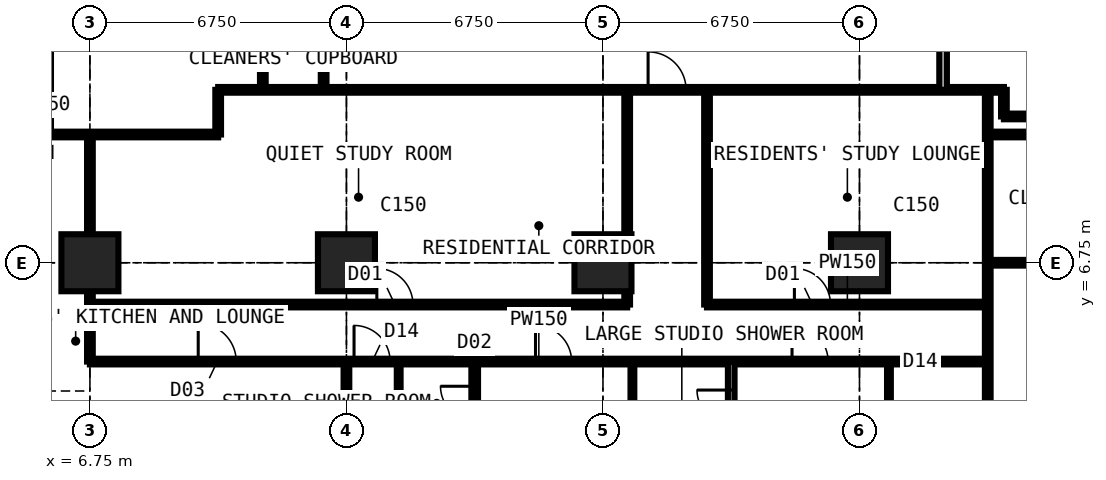
"""IFC4 building model, lengths in metres.
Left out: names, types, materials, properties, quantities, classifications, styles, units other than length and angle.
Written with IfcOpenShell. Run it as: python <this file> out.ifc"""

import sys

from ifc_helpers import new_model, si_unit, direction, frame, frame_2d, origin, origin_2d, place, context, subcontext, project, spatial, rectangle, extrude, element, fill, save


model = new_model("IFC4")
c1 = context("Model", 3, precision=1e-05, world=origin(), true_north=direction((0.0, 1.0)))
c2 = subcontext(c1, "Body", "Model", "MODEL_VIEW")
j1 = project(units=[si_unit("LENGTHUNIT", "METRE"), si_unit("PLANEANGLEUNIT", "RADIAN")], contexts=[c1])
p1 = place(None, origin())
s1 = spatial("IfcSite", under=j1, at=p1, CompositionType="ELEMENT")
p2 = place(p1, origin())
s2 = spatial("IfcBuilding", under=s1, at=p2, CompositionType="ELEMENT")
p3 = place(p2, frame((0.0, 0.0, 126.9)))
s3 = spatial("IfcBuildingStorey", under=s2, at=p3, CompositionType="ELEMENT", Elevation=126.9)
for number, where, z_axis, x_axis in (
    (1, (6.75, 6.75, 0.0), (0.0, 0.0, 1.0), (1.0, 0.0, 0.0)),
    (2, (13.5, 6.75, 0.0), (0.0, 0.0, 1.0), (1.0, 0.0, 0.0)),
    (3, (20.25, 6.75, 0.0), (0.0, 0.0, 1.0), (1.0, 0.0, 0.0)),
    (4, (27.0, 6.75, 0.0), (0.0, 0.0, 1.0), (1.0, 0.0, 0.0)),
):
    element("IfcColumn", number, at=place(p3, frame(where, z_axis=z_axis, x_axis=x_axis)), inside=s3, PredefinedType="COLUMN", context=c2, shape_type="SweptSolid", body=[
        extrude(rectangle(XDim=1.5, YDim=1.5, at=origin_2d()), origin(), (0.0, 0.0, 1.0), 3.6),
    ])
p4 = place(p3, frame((-0.734, 10.125, 0.0), z_axis=(0.0, 0.0, 1.0), x_axis=(1.0, 0.0, 0.0)))
e5 = element("IfcWall", 5, at=p4, inside=s3, PredefinedType="PARTITIONING", context=c2, shape_type="SweptSolid", body=[
    extrude(rectangle(XDim=10.859, YDim=0.15, at=frame_2d((5.429, 0.0))), origin(), (0.0, 0.0, 1.0), 3.375),
])
p5 = place(p3, frame((6.75, 4.15, 0.0), z_axis=(0.0, 0.0, 1.0), x_axis=(0.0, 1.0, 0.0)))
e6 = element("IfcWall", 6, at=p5, inside=s3, PredefinedType="PARTITIONING", context=c2, shape_type="SweptSolid", body=[
    extrude(rectangle(XDim=5.975, YDim=0.15, at=frame_2d((2.988, 0.0))), origin(), (0.0, 0.0, 1.0), 2.877),
])
p6 = place(p3, frame((6.75, 4.15, 0.0), z_axis=(0.0, 0.0, 1.0), x_axis=(1.0, 0.0, 0.0)))
e7 = element("IfcWall", 7, at=p6, inside=s3, PredefinedType="PARTITIONING", context=c2, shape_type="SweptSolid", body=[
    extrude(rectangle(XDim=23.625, YDim=0.15, at=frame_2d((11.812, 0.0))), origin(), (0.0, 0.0, 1.0), 3.375),
])
p7 = place(p6, frame((2.85, 0.0, 0.0)))
e8 = element("IfcOpeningElement", 8, at=p7, cuts=e7, PredefinedType="OPENING", context=c2, shape_type="SweptSolid", body=[
    extrude(rectangle(XDim=1.0, YDim=2.2, at=frame_2d((0.5, 1.1))), frame((0.0, 0.085, 0.0), z_axis=(0.0, -1.0, 0.0), x_axis=(1.0, 0.0, 0.0)), (0.0, 0.0, 1.0), 0.17),
])
p8 = place(p6, frame((18.475, 0.0, 0.0)))
e9 = element("IfcOpeningElement", 9, at=p8, cuts=e7, PredefinedType="OPENING", context=c2, shape_type="SweptSolid", body=[
    extrude(rectangle(XDim=0.95, YDim=2.2, at=frame_2d((0.475, 1.1))), frame((0.0, 0.085, 0.0), z_axis=(0.0, -1.0, 0.0), x_axis=(1.0, 0.0, 0.0)), (0.0, 0.0, 1.0), 0.17),
])
p9 = place(p6, frame((11.725, 0.0, 0.0)))
e10 = element("IfcOpeningElement", 10, at=p9, cuts=e7, PredefinedType="OPENING", context=c2, shape_type="SweptSolid", body=[
    extrude(rectangle(XDim=0.95, YDim=2.2, at=frame_2d((0.475, 1.1))), frame((0.0, 0.085, 0.0), z_axis=(0.0, -1.0, 0.0), x_axis=(1.0, 0.0, 0.0)), (0.0, 0.0, 1.0), 0.17),
])
p10 = place(p6, frame((6.95, 0.0, 0.0)))
e11 = element("IfcOpeningElement", 11, at=p10, cuts=e7, PredefinedType="OPENING", context=c2, shape_type="SweptSolid", body=[
    extrude(rectangle(XDim=0.95, YDim=2.2, at=frame_2d((0.475, 1.1))), frame((0.0, 0.085, 0.0), z_axis=(0.0, -1.0, 0.0), x_axis=(1.0, 0.0, 0.0)), (0.0, 0.0, 1.0), 0.17),
])
p11 = place(p3, frame((6.75, 5.65, 0.0), z_axis=(0.0, 0.0, 1.0), x_axis=(1.0, 0.0, 0.0)))
e12 = element("IfcWall", 12, at=p11, inside=s3, PredefinedType="PARTITIONING", context=c2, shape_type="SweptSolid", body=[
    extrude(rectangle(XDim=14.137, YDim=0.15, at=frame_2d((7.069, 0.0))), origin(), (0.0, 0.0, 1.0), 3.375),
])
p12 = place(p11, frame((7.55, 0.0, 0.0)))
e13 = element("IfcOpeningElement", 13, at=p12, cuts=e12, PredefinedType="OPENING", context=c2, shape_type="SweptSolid", body=[
    extrude(rectangle(XDim=0.95, YDim=2.2, at=frame_2d((0.475, 1.1))), frame((0.0, 0.085, 0.0), z_axis=(0.0, -1.0, 0.0), x_axis=(1.0, 0.0, 0.0)), (0.0, 0.0, 1.0), 0.17),
])
p13 = place(p3, frame((10.125, 10.125, 0.0), z_axis=(0.0, 0.0, 1.0), x_axis=(0.0, 1.0, 0.0)))
e14 = element("IfcWall", 14, at=p13, inside=s3, PredefinedType="PARTITIONING", context=c2, shape_type="SweptSolid", body=[
    extrude(rectangle(XDim=1.175, YDim=0.15, at=frame_2d((0.587, 0.0))), origin(), (0.0, 0.0, 1.0), 3.375),
])
p14 = place(p3, frame((10.125, 11.3, 0.0), z_axis=(0.0, 0.0, 1.0), x_axis=(1.0, 0.0, 0.0)))
e15 = element("IfcWall", 15, at=p14, inside=s3, PredefinedType="PARTITIONING", context=c2, shape_type="SweptSolid", body=[
    extrude(rectangle(XDim=20.675, YDim=0.15, at=frame_2d((10.337, 0.0))), origin(), (0.0, 0.0, 1.0), 3.375),
])
p15 = place(p14, frame((11.312, 0.0, 0.0)))
e16 = element("IfcOpeningElement", 16, at=p15, cuts=e15, PredefinedType="OPENING", context=c2, shape_type="SweptSolid", body=[
    extrude(rectangle(XDim=1.0, YDim=2.2, at=frame_2d((0.5, 1.1))), frame((0.0, 0.085, 0.0), z_axis=(0.0, -1.0, 0.0), x_axis=(1.0, 0.0, 0.0)), (0.0, 0.0, 1.0), 0.17),
])
p16 = place(p3, frame((11.3, 11.3, 0.0), z_axis=(0.0, 0.0, 1.0), x_axis=(0.0, 1.0, 0.0)))
e17 = element("IfcWall", 17, at=p16, inside=s3, PredefinedType="PARTITIONING", context=c2, shape_type="SweptSolid", body=[
    extrude(rectangle(XDim=19.3, YDim=0.15, at=frame_2d((9.65, 0.0))), origin(), (0.0, 0.0, 1.0), 3.375),
])
p17 = place(p16, frame((13.525, 0.0, 0.0)))
e18 = element("IfcOpeningElement", 18, at=p17, cuts=e17, PredefinedType="OPENING", context=c2, shape_type="SweptSolid", body=[
    extrude(rectangle(XDim=1.0, YDim=2.2, at=frame_2d((0.5, 1.1))), frame((0.0, 0.085, 0.0), z_axis=(0.0, -1.0, 0.0), x_axis=(1.0, 0.0, 0.0)), (0.0, 0.0, 1.0), 0.17),
])
p18 = place(p16, frame((10.438, 0.0, 0.0)))
e19 = element("IfcOpeningElement", 19, at=p18, cuts=e17, PredefinedType="OPENING", context=c2, shape_type="SweptSolid", body=[
    extrude(rectangle(XDim=1.0, YDim=2.2, at=frame_2d((0.5, 1.1))), frame((0.0, 0.085, 0.0), z_axis=(0.0, -1.0, 0.0), x_axis=(1.0, 0.0, 0.0)), (0.0, 0.0, 1.0), 0.17),
])
p19 = place(p3, frame((12.9, 11.3, 0.0), z_axis=(0.0, 0.0, 1.0), x_axis=(0.0, 1.0, 0.0)))
e20 = element("IfcWall", 20, at=p19, inside=s3, PredefinedType="PARTITIONING", context=c2, shape_type="SweptSolid", body=[
    extrude(rectangle(XDim=1.6, YDim=0.15, at=frame_2d((0.8, 0.0))), origin(), (0.0, 0.0, 1.0), 3.375),
])
p20 = place(p3, frame((13.5, -0.734, 0.0), z_axis=(0.0, 0.0, 1.0), x_axis=(0.0, 1.0, 0.0)))
e21 = element("IfcWall", 21, at=p20, inside=s3, PredefinedType="PARTITIONING", context=c2, shape_type="SweptSolid", body=[
    extrude(rectangle(XDim=4.884, YDim=0.15, at=frame_2d((2.442, 0.0))), origin(), (0.0, 0.0, 1.0), 2.61),
])
p21 = place(p3, frame((14.875, 1.95, 0.0), z_axis=(0.0, 0.0, 1.0), x_axis=(0.0, 1.0, 0.0)))
e22 = element("IfcWall", 22, at=p21, inside=s3, PredefinedType="PARTITIONING", context=c2, shape_type="SweptSolid", body=[
    extrude(rectangle(XDim=2.2, YDim=0.1, at=frame_2d((1.1, 0.0))), origin(), (0.0, 0.0, 1.0), 3.375),
])
p22 = place(p3, frame((16.875, -0.734, 0.0), z_axis=(0.0, 0.0, 1.0), x_axis=(0.0, 1.0, 0.0)))
e23 = element("IfcWall", 23, at=p22, inside=s3, PredefinedType="PARTITIONING", context=c2, shape_type="SweptSolid", body=[
    extrude(rectangle(XDim=4.884, YDim=0.175, at=frame_2d((2.442, 0.0))), origin(), (0.0, 0.0, 1.0), 3.375),
])
p23 = place(p22, frame((3.334, 0.0, 0.0)))
e24 = element("IfcOpeningElement", 24, at=p23, cuts=e23, PredefinedType="OPENING", context=c2, shape_type="SweptSolid", body=[
    extrude(rectangle(XDim=0.9, YDim=2.2, at=frame_2d((0.45, 1.1))), frame((0.0, 0.097, 0.0), z_axis=(0.0, -1.0, 0.0), x_axis=(1.0, 0.0, 0.0)), (0.0, 0.0, 1.0), 0.195),
])
p24 = place(p3, frame((20.887, 5.65, 0.0), z_axis=(0.0, 0.0, 1.0), x_axis=(0.0, 1.0, 0.0)))
e25 = element("IfcWall", 25, at=p24, inside=s3, PredefinedType="PARTITIONING", context=c2, shape_type="SweptSolid", body=[
    extrude(rectangle(XDim=5.65, YDim=0.15, at=frame_2d((2.825, 0.0))), origin(), (0.0, 0.0, 1.0), 3.375),
])
p25 = place(p3, frame((21.025, 1.75, 0.0), z_axis=(0.0, 0.0, 1.0), x_axis=(0.0, 1.0, 0.0)))
e26 = element("IfcWall", 26, at=p25, inside=s3, PredefinedType="PARTITIONING", context=c2, shape_type="SweptSolid", body=[
    extrude(rectangle(XDim=2.4, YDim=0.1, at=frame_2d((1.2, 0.0))), origin(), (0.0, 0.0, 1.0), 3.375),
])
p26 = place(p3, frame((22.988, 5.65, 0.0), z_axis=(0.0, 0.0, 1.0), x_axis=(1.0, 0.0, 0.0)))
e27 = element("IfcWall", 27, at=p26, inside=s3, PredefinedType="PARTITIONING", context=c2, shape_type="SweptSolid", body=[
    extrude(rectangle(XDim=7.387, YDim=0.15, at=frame_2d((3.694, 0.0))), origin(), (0.0, 0.0, 1.0), 3.375),
])
p27 = place(p26, frame((2.3, 0.0, 0.0)))
e28 = element("IfcOpeningElement", 28, at=p27, cuts=e27, PredefinedType="OPENING", context=c2, shape_type="SweptSolid", body=[
    extrude(rectangle(XDim=0.95, YDim=2.2, at=frame_2d((0.475, 1.1))), frame((0.0, 0.085, 0.0), z_axis=(0.0, -1.0, 0.0), x_axis=(1.0, 0.0, 0.0)), (0.0, 0.0, 1.0), 0.17),
])
p28 = place(p3, frame((22.988, 5.65, 0.0), z_axis=(0.0, 0.0, 1.0), x_axis=(0.0, 1.0, 0.0)))
e29 = element("IfcWall", 29, at=p28, inside=s3, PredefinedType="PARTITIONING", context=c2, shape_type="SweptSolid", body=[
    extrude(rectangle(XDim=5.65, YDim=0.15, at=frame_2d((2.825, 0.0))), origin(), (0.0, 0.0, 1.0), 3.375),
])
p29 = place(p3, frame((23.625, -0.734, 0.0), z_axis=(0.0, 0.0, 1.0), x_axis=(0.0, 1.0, 0.0)))
e30 = element("IfcWall", 30, at=p29, inside=s3, PredefinedType="PARTITIONING", context=c2, shape_type="SweptSolid", body=[
    extrude(rectangle(XDim=4.884, YDim=0.175, at=frame_2d((2.442, 0.0))), origin(), (0.0, 0.0, 1.0), 3.375),
])
p30 = place(p29, frame((3.234, 0.0, 0.0)))
e31 = element("IfcOpeningElement", 31, at=p30, cuts=e30, PredefinedType="OPENING", context=c2, shape_type="SweptSolid", body=[
    extrude(rectangle(XDim=0.9, YDim=2.2, at=frame_2d((0.45, 1.1))), frame((0.0, 0.097, 0.0), z_axis=(0.0, -1.0, 0.0), x_axis=(1.0, 0.0, 0.0)), (0.0, 0.0, 1.0), 0.195),
])
p31 = place(p3, frame((27.775, 1.75, 0.0), z_axis=(0.0, 0.0, 1.0), x_axis=(0.0, 1.0, 0.0)))
e32 = element("IfcWall", 32, at=p31, inside=s3, PredefinedType="PARTITIONING", context=c2, shape_type="SweptSolid", body=[
    extrude(rectangle(XDim=2.4, YDim=0.1, at=frame_2d((1.2, 0.0))), origin(), (0.0, 0.0, 1.0), 3.375),
])
p32 = place(p3, frame((29.2, 11.3, 0.0), z_axis=(0.0, 0.0, 1.0), x_axis=(0.0, 1.0, 0.0)))
e33 = element("IfcWall", 33, at=p32, inside=s3, PredefinedType="PARTITIONING", context=c2, shape_type="SweptSolid", body=[
    extrude(rectangle(XDim=17.9, YDim=0.2, at=frame_2d((8.95, 0.0))), origin(), (0.0, 0.0, 1.0), 3.375),
])
p33 = place(p32, frame((8.35, 0.0, 0.0)))
e34 = element("IfcOpeningElement", 34, at=p33, cuts=e33, PredefinedType="OPENING", context=c2, shape_type="SweptSolid", body=[
    extrude(rectangle(XDim=1.2, YDim=2.2, at=frame_2d((0.6, 1.1))), frame((0.0, 0.11, 0.0), z_axis=(0.0, -1.0, 0.0), x_axis=(1.0, 0.0, 0.0)), (0.0, 0.0, 1.0), 0.22),
])
p34 = place(p3, frame((30.375, -0.734, 0.0), z_axis=(0.0, 0.0, 1.0), x_axis=(0.0, 1.0, 0.0)))
e35 = element("IfcWall", 35, at=p34, inside=s3, PredefinedType="PARTITIONING", context=c2, shape_type="SweptSolid", body=[
    extrude(rectangle(XDim=12.034, YDim=0.15, at=frame_2d((6.017, 0.0))), origin(), (0.0, 0.0, 1.0), 3.375),
])
p35 = place(p3, frame((30.375, 6.75, 0.0), z_axis=(0.0, 0.0, 1.0), x_axis=(1.0, 0.0, 0.0)))
e36 = element("IfcWall", 36, at=p35, inside=s3, PredefinedType="PARTITIONING", context=c2, shape_type="SweptSolid", body=[
    extrude(rectangle(XDim=10.859, YDim=0.15, at=frame_2d((5.429, 0.0))), origin(), (0.0, 0.0, 1.0), 2.877),
])
p36 = place(p35, frame((1.6, 0.0, 0.0)))
e37 = element("IfcOpeningElement", 37, at=p36, cuts=e36, PredefinedType="OPENING", context=c2, shape_type="SweptSolid", body=[
    extrude(rectangle(XDim=1.0, YDim=2.2, at=frame_2d((0.5, 1.1))), frame((0.0, 0.085, 0.0), z_axis=(0.0, -1.0, 0.0), x_axis=(1.0, 0.0, 0.0)), (0.0, 0.0, 1.0), 0.17),
])
p37 = place(p3, frame((30.375, 10.125, 0.0), z_axis=(0.0, 0.0, 1.0), x_axis=(1.0, 0.0, 0.0)))
e38 = element("IfcWall", 38, at=p37, inside=s3, PredefinedType="PARTITIONING", context=c2, shape_type="SweptSolid", body=[
    extrude(rectangle(XDim=10.859, YDim=0.15, at=frame_2d((5.429, 0.0))), origin(), (0.0, 0.0, 1.0), 3.375),
])
p38 = place(p37, frame((2.5, 0.0, 0.0)))
e39 = element("IfcOpeningElement", 39, at=p38, cuts=e38, PredefinedType="OPENING", context=c2, shape_type="SweptSolid", body=[
    extrude(rectangle(XDim=1.0, YDim=2.2, at=frame_2d((0.5, 1.1))), frame((0.0, 0.085, 0.0), z_axis=(0.0, -1.0, 0.0), x_axis=(1.0, 0.0, 0.0)), (0.0, 0.0, 1.0), 0.17),
])
p39 = place(p3, frame((30.8, 10.6, 0.0), z_axis=(0.0, 0.0, 1.0), x_axis=(0.0, 1.0, 0.0)))
e40 = element("IfcWall", 40, at=p39, inside=s3, PredefinedType="PARTITIONING", context=c2, shape_type="SweptSolid", body=[
    extrude(rectangle(XDim=0.7, YDim=0.15, at=frame_2d((0.35, 0.0))), origin(), (0.0, 0.0, 1.0), 3.375),
])
p40 = place(p3, frame((30.8, 10.6, 0.0), z_axis=(0.0, 0.0, 1.0), x_axis=(1.0, 0.0, 0.0)))
e41 = element("IfcWall", 41, at=p40, inside=s3, PredefinedType="PARTITIONING", context=c2, shape_type="SweptSolid", body=[
    extrude(rectangle(XDim=1.85, YDim=0.15, at=frame_2d((0.925, 0.0))), origin(), (0.0, 0.0, 1.0), 3.375),
])
p41 = place(p7, origin())
e42 = element("IfcDoor", 42, at=p41, inside=s3, OperationType="SINGLE_SWING_LEFT", PredefinedType="DOOR", context=c2, shape_type="SweptSolid", body=[
    extrude(rectangle(XDim=1.0, YDim=2.2, at=frame_2d((0.5, 1.1))), frame((0.0, 0.025, 0.0), z_axis=(0.0, -1.0, 0.0), x_axis=(1.0, 0.0, 0.0)), (0.0, 0.0, 1.0), 0.05),
])
fill(e8, e42)
p42 = place(p8, origin())
e43 = element("IfcDoor", 43, at=p42, inside=s3, OperationType="SINGLE_SWING_LEFT", PredefinedType="DOOR", context=c2, shape_type="SweptSolid", body=[
    extrude(rectangle(XDim=0.95, YDim=2.2, at=frame_2d((0.475, 1.1))), frame((0.0, 0.025, 0.0), z_axis=(0.0, -1.0, 0.0), x_axis=(1.0, 0.0, 0.0)), (0.0, 0.0, 1.0), 0.05),
])
fill(e9, e43)
p43 = place(p9, origin())
e44 = element("IfcDoor", 44, at=p43, inside=s3, OperationType="SINGLE_SWING_LEFT", PredefinedType="DOOR", context=c2, shape_type="SweptSolid", body=[
    extrude(rectangle(XDim=0.95, YDim=2.2, at=frame_2d((0.475, 1.1))), frame((0.0, 0.025, 0.0), z_axis=(0.0, -1.0, 0.0), x_axis=(1.0, 0.0, 0.0)), (0.0, 0.0, 1.0), 0.05),
])
fill(e10, e44)
p44 = place(p30, origin())
e45 = element("IfcDoor", 45, at=p44, inside=s3, OperationType="SINGLE_SWING_RIGHT", PredefinedType="DOOR", context=c2, shape_type="SweptSolid", body=[
    extrude(rectangle(XDim=0.9, YDim=2.2, at=frame_2d((0.45, 1.1))), frame((0.0, 0.025, 0.0), z_axis=(0.0, -1.0, 0.0), x_axis=(1.0, 0.0, 0.0)), (0.0, 0.0, 1.0), 0.05),
])
fill(e31, e45)
p45 = place(p10, origin())
e46 = element("IfcDoor", 46, at=p45, inside=s3, OperationType="SINGLE_SWING_LEFT", PredefinedType="DOOR", context=c2, shape_type="SweptSolid", body=[
    extrude(rectangle(XDim=0.95, YDim=2.2, at=frame_2d((0.475, 1.1))), frame((0.0, 0.025, 0.0), z_axis=(0.0, -1.0, 0.0), x_axis=(1.0, 0.0, 0.0)), (0.0, 0.0, 1.0), 0.05),
])
fill(e11, e46)
p46 = place(p23, origin())
e47 = element("IfcDoor", 47, at=p46, inside=s3, OperationType="SINGLE_SWING_RIGHT", PredefinedType="DOOR", context=c2, shape_type="SweptSolid", body=[
    extrude(rectangle(XDim=0.9, YDim=2.2, at=frame_2d((0.45, 1.1))), frame((0.0, 0.025, 0.0), z_axis=(0.0, -1.0, 0.0), x_axis=(1.0, 0.0, 0.0)), (0.0, 0.0, 1.0), 0.05),
])
fill(e24, e47)
p47 = place(p15, origin())
e48 = element("IfcDoor", 48, at=p47, inside=s3, OperationType="SINGLE_SWING_LEFT", PredefinedType="DOOR", context=c2, shape_type="SweptSolid", body=[
    extrude(rectangle(XDim=1.0, YDim=2.2, at=frame_2d((0.5, 1.1))), frame((0.0, 0.025, 0.0), z_axis=(0.0, -1.0, 0.0), x_axis=(1.0, 0.0, 0.0)), (0.0, 0.0, 1.0), 0.05),
])
fill(e16, e48)
p48 = place(p27, origin())
e49 = element("IfcDoor", 49, at=p48, inside=s3, OperationType="SINGLE_SWING_LEFT", PredefinedType="DOOR", context=c2, shape_type="SweptSolid", body=[
    extrude(rectangle(XDim=0.95, YDim=2.2, at=frame_2d((0.475, 1.1))), frame((0.0, 0.025, 0.0), z_axis=(0.0, -1.0, 0.0), x_axis=(1.0, 0.0, 0.0)), (0.0, 0.0, 1.0), 0.05),
])
fill(e28, e49)
p49 = place(p12, origin())
e50 = element("IfcDoor", 50, at=p49, inside=s3, OperationType="SINGLE_SWING_LEFT", PredefinedType="DOOR", context=c2, shape_type="SweptSolid", body=[
    extrude(rectangle(XDim=0.95, YDim=2.2, at=frame_2d((0.475, 1.1))), frame((0.0, 0.025, 0.0), z_axis=(0.0, -1.0, 0.0), x_axis=(1.0, 0.0, 0.0)), (0.0, 0.0, 1.0), 0.05),
])
fill(e13, e50)
save(model, sys.argv[1])
